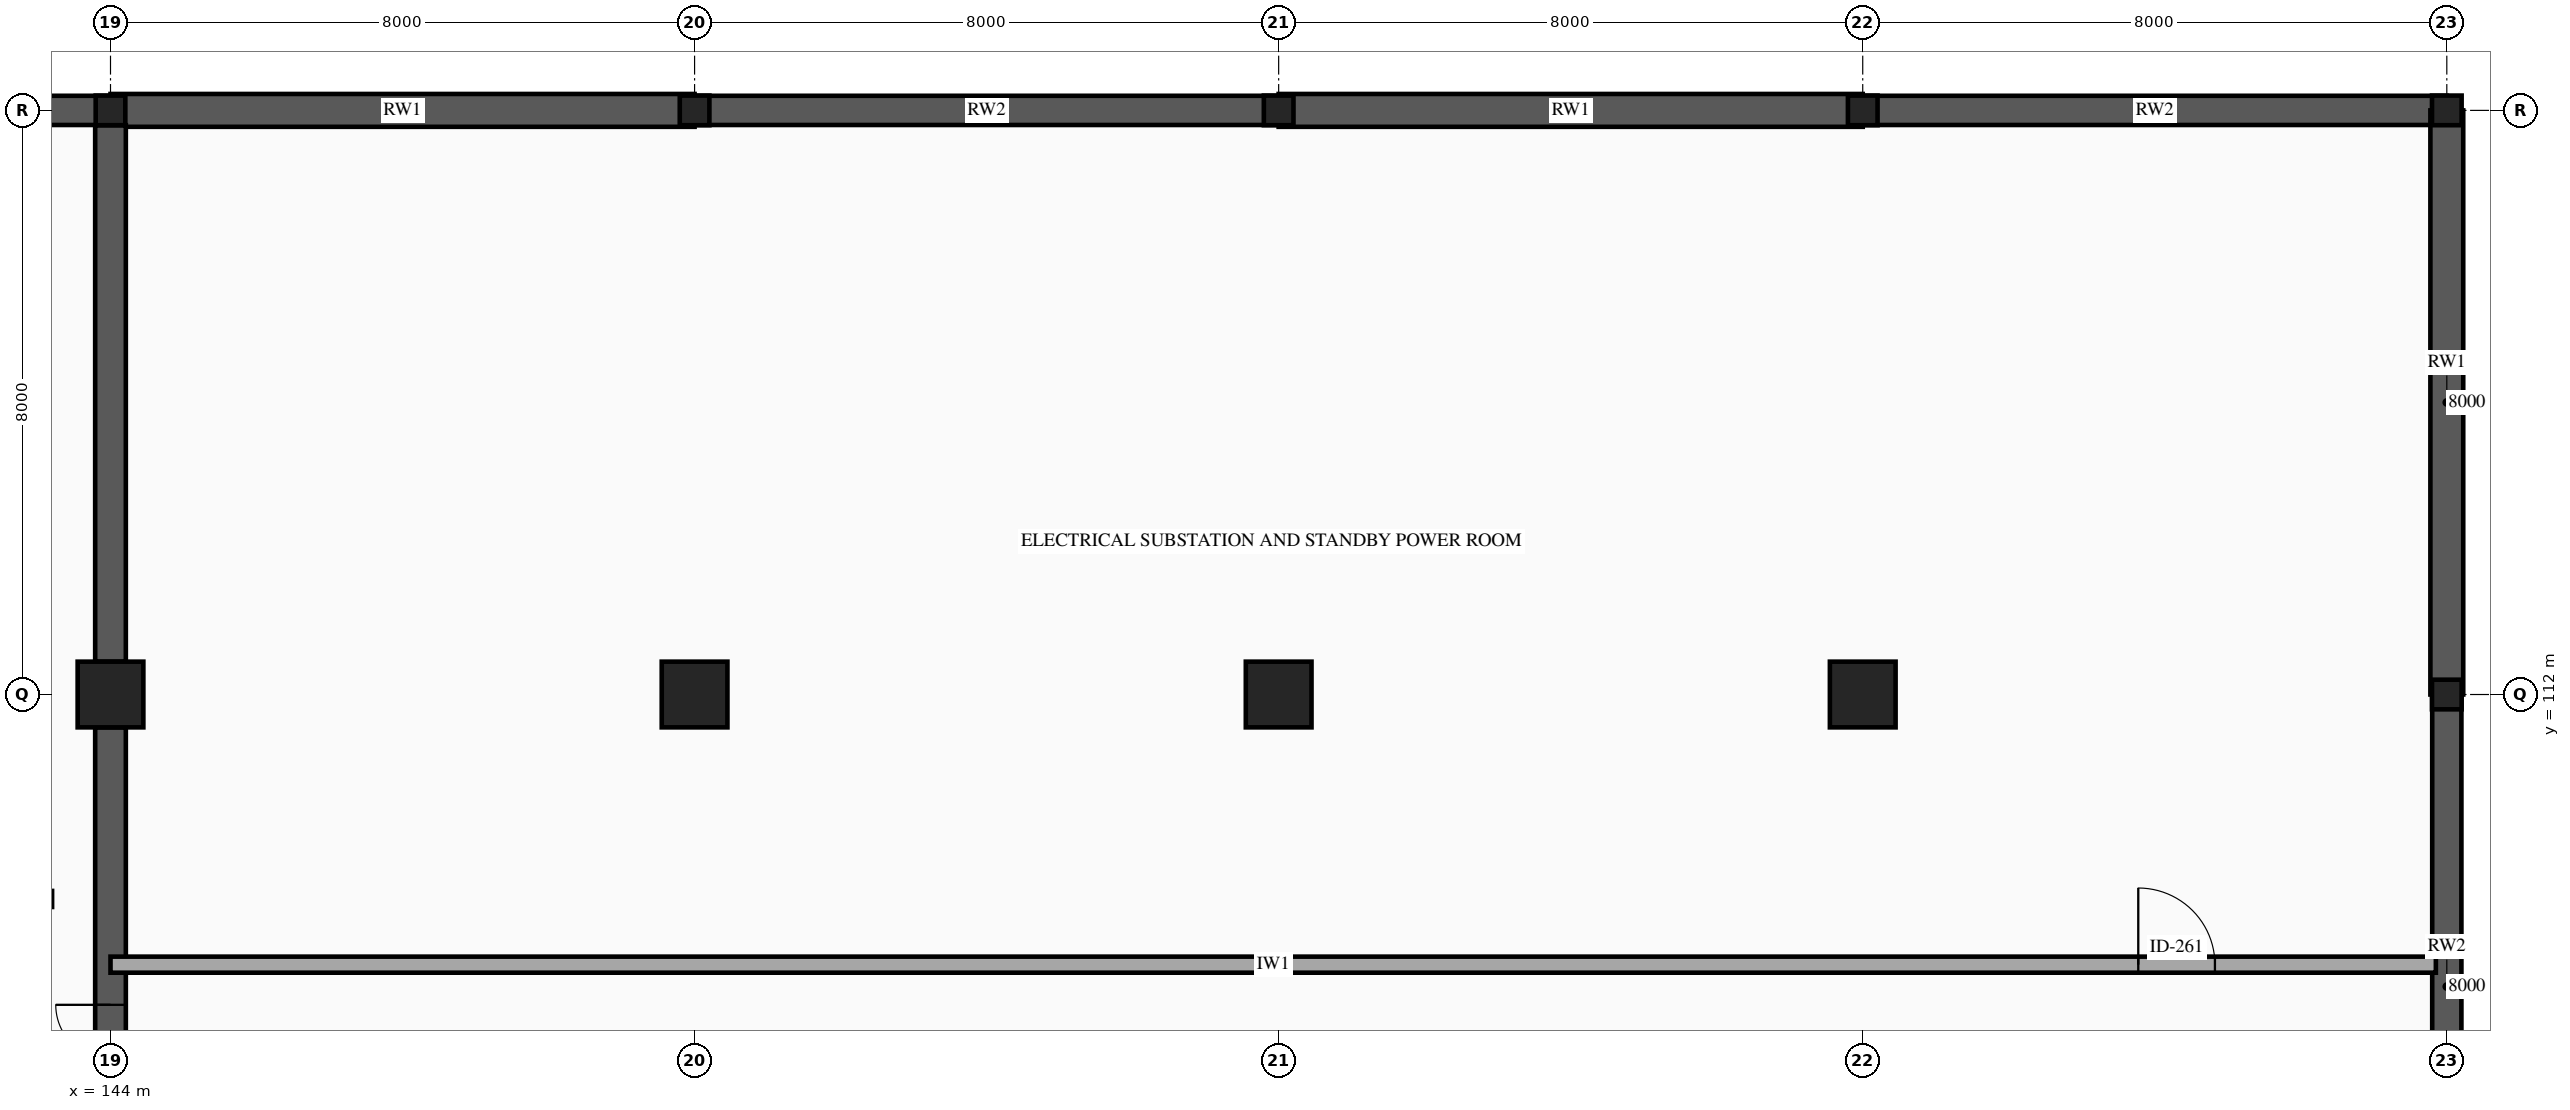
"""IFC4 building model, lengths in metres.
Left out: names, types, materials, properties, quantities, classifications, styles, units other than length and angle.
Written with IfcOpenShell. Run it as: python <this file> out.ifc"""

import sys

from ifc_helpers import new_model, si_unit, direction, frame, frame_2d, origin, origin_2d, place, context, subcontext, project, spatial, rectangle, hollow_rectangle, extrude, element, fill, save


model = new_model("IFC4")
c1 = context("Model", 3, precision=1e-05, world=origin(), true_north=direction((0.0, 1.0)))
c2 = subcontext(c1, "Body", "Model", "MODEL_VIEW")
j1 = project(units=[si_unit("LENGTHUNIT", "METRE"), si_unit("PLANEANGLEUNIT", "RADIAN")], contexts=[c1])
p1 = place(None, origin())
s1 = spatial("IfcSite", under=j1, at=p1, CompositionType="ELEMENT")
p2 = place(p1, origin())
s2 = spatial("IfcBuilding", under=s1, at=p2, CompositionType="ELEMENT")
p3 = place(p2, frame((0.0, 0.0, -4.8)))
s3 = spatial("IfcBuildingStorey", under=s2, at=p3, CompositionType="ELEMENT", Elevation=-4.8)
p4 = place(p3, frame((144.0, 112.0, 0.0), z_axis=(0.0, 0.0, 1.0), x_axis=(1.0, 0.0, 0.0)))
e1 = element("IfcColumn", 1, at=p4, inside=s3, PredefinedType="COLUMN", context=c2, shape_type="SweptSolid", body=[
    extrude(rectangle(XDim=0.9, YDim=0.9, at=origin_2d()), origin(), (0.0, 0.0, 1.0), 4.8),
])
p5 = place(p3, frame((144.0, 120.0, 0.0), z_axis=(0.0, 0.0, 1.0), x_axis=(1.0, 0.0, 0.0)))
e2 = element("IfcColumn", 2, at=p5, inside=s3, PredefinedType="COLUMN", context=c2, shape_type="SweptSolid", body=[
    extrude(hollow_rectangle(XDim=0.406, YDim=0.406, WallThickness=0.015, InnerFilletRadius=0.015, OuterFilletRadius=0.029, at=origin_2d()), origin(), (0.0, 0.0, 1.0), 4.8),
])
p6 = place(p3, frame((152.0, 112.0, 0.0), z_axis=(0.0, 0.0, 1.0), x_axis=(1.0, 0.0, 0.0)))
e3 = element("IfcColumn", 3, at=p6, inside=s3, PredefinedType="COLUMN", context=c2, shape_type="SweptSolid", body=[
    extrude(rectangle(XDim=0.9, YDim=0.9, at=origin_2d()), origin(), (0.0, 0.0, 1.0), 4.8),
])
p7 = place(p3, frame((152.0, 120.0, 0.0), z_axis=(0.0, 0.0, 1.0), x_axis=(1.0, 0.0, 0.0)))
e4 = element("IfcColumn", 4, at=p7, inside=s3, PredefinedType="COLUMN", context=c2, shape_type="SweptSolid", body=[
    extrude(hollow_rectangle(XDim=0.406, YDim=0.406, WallThickness=0.015, InnerFilletRadius=0.015, OuterFilletRadius=0.029, at=origin_2d()), origin(), (0.0, 0.0, 1.0), 4.8),
])
p8 = place(p3, frame((160.0, 112.0, 0.0), z_axis=(0.0, 0.0, 1.0), x_axis=(1.0, 0.0, 0.0)))
e5 = element("IfcColumn", 5, at=p8, inside=s3, PredefinedType="COLUMN", context=c2, shape_type="SweptSolid", body=[
    extrude(rectangle(XDim=0.9, YDim=0.9, at=origin_2d()), origin(), (0.0, 0.0, 1.0), 4.8),
])
p9 = place(p3, frame((160.0, 120.0, 0.0), z_axis=(0.0, 0.0, 1.0), x_axis=(1.0, 0.0, 0.0)))
e6 = element("IfcColumn", 6, at=p9, inside=s3, PredefinedType="COLUMN", context=c2, shape_type="SweptSolid", body=[
    extrude(hollow_rectangle(XDim=0.406, YDim=0.406, WallThickness=0.015, InnerFilletRadius=0.015, OuterFilletRadius=0.029, at=origin_2d()), origin(), (0.0, 0.0, 1.0), 4.8),
])
p10 = place(p3, frame((168.0, 112.0, 0.0), z_axis=(0.0, 0.0, 1.0), x_axis=(1.0, 0.0, 0.0)))
e7 = element("IfcColumn", 7, at=p10, inside=s3, PredefinedType="COLUMN", context=c2, shape_type="SweptSolid", body=[
    extrude(rectangle(XDim=0.9, YDim=0.9, at=origin_2d()), origin(), (0.0, 0.0, 1.0), 4.8),
])
for number, where, z_axis, x_axis in (
    (8, (168.0, 120.0, 0.0), (0.0, 0.0, 1.0), (1.0, 0.0, 0.0)),
    (9, (176.0, 112.0, 0.0), (0.0, 0.0, 1.0), (1.0, 0.0, 0.0)),
    (10, (176.0, 120.0, 0.0), (0.0, 0.0, 1.0), (1.0, 0.0, 0.0)),
):
    element("IfcColumn", number, at=place(p3, frame(where, z_axis=z_axis, x_axis=x_axis)), inside=s3, PredefinedType="COLUMN", context=c2, shape_type="SweptSolid", body=[
        extrude(hollow_rectangle(XDim=0.406, YDim=0.406, WallThickness=0.015, InnerFilletRadius=0.015, OuterFilletRadius=0.029, at=origin_2d()), origin(), (0.0, 0.0, 1.0), 4.8),
    ])
p11 = place(p3, frame((136.0, 120.0, 0.0), z_axis=(0.0, 0.0, 1.0), x_axis=(1.0, 0.0, 0.0)))
e11 = element("IfcWall", 11, at=p11, inside=s3, PredefinedType="USERDEFINED", context=c2, shape_type="SweptSolid", body=[
    extrude(rectangle(XDim=8.0, YDim=0.4, at=frame_2d((4.0, 0.0))), origin(), (0.0, 0.0, 1.0), 4.5),
])
p12 = place(p3, frame((144.0, 120.0, 0.0), z_axis=(0.0, 0.0, 1.0), x_axis=(1.0, 0.0, 0.0)))
e12 = element("IfcWall", 12, at=p12, inside=s3, PredefinedType="USERDEFINED", context=c2, shape_type="SweptSolid", body=[
    extrude(rectangle(XDim=8.0, YDim=0.45, at=frame_2d((4.0, 0.0))), origin(), (0.0, 0.0, 1.0), 4.5),
])
p13 = place(p3, frame((152.0, 120.0, 0.0), z_axis=(0.0, 0.0, 1.0), x_axis=(1.0, 0.0, 0.0)))
e13 = element("IfcWall", 13, at=p13, inside=s3, PredefinedType="USERDEFINED", context=c2, shape_type="SweptSolid", body=[
    extrude(rectangle(XDim=8.0, YDim=0.4, at=frame_2d((4.0, 0.0))), origin(), (0.0, 0.0, 1.0), 4.5),
])
p14 = place(p3, frame((160.0, 120.0, 0.0), z_axis=(0.0, 0.0, 1.0), x_axis=(1.0, 0.0, 0.0)))
e14 = element("IfcWall", 14, at=p14, inside=s3, PredefinedType="USERDEFINED", context=c2, shape_type="SweptSolid", body=[
    extrude(rectangle(XDim=8.0, YDim=0.45, at=frame_2d((4.0, 0.0))), origin(), (0.0, 0.0, 1.0), 4.5),
])
p15 = place(p3, frame((168.0, 120.0, 0.0), z_axis=(0.0, 0.0, 1.0), x_axis=(1.0, 0.0, 0.0)))
e15 = element("IfcWall", 15, at=p15, inside=s3, PredefinedType="USERDEFINED", context=c2, shape_type="SweptSolid", body=[
    extrude(rectangle(XDim=8.0, YDim=0.4, at=frame_2d((4.0, 0.0))), origin(), (0.0, 0.0, 1.0), 4.5),
])
p16 = place(p3, frame((176.0, 120.0, 0.0), z_axis=(0.0, 0.0, 1.0), x_axis=(0.0, -1.0, 0.0)))
e16 = element("IfcWall", 16, at=p16, inside=s3, PredefinedType="USERDEFINED", context=c2, shape_type="SweptSolid", body=[
    extrude(rectangle(XDim=8.0, YDim=0.45, at=frame_2d((4.0, 0.0))), origin(), (0.0, 0.0, 1.0), 4.5),
])
p17 = place(p3, frame((176.0, 112.0, 0.0), z_axis=(0.0, 0.0, 1.0), x_axis=(0.0, -1.0, 0.0)))
e17 = element("IfcWall", 17, at=p17, inside=s3, PredefinedType="USERDEFINED", context=c2, shape_type="SweptSolid", body=[
    extrude(rectangle(XDim=8.0, YDim=0.4, at=frame_2d((4.0, 0.0))), origin(), (0.0, 0.0, 1.0), 4.5),
])
p18 = place(p3, frame((144.0, 104.45, 0.0), z_axis=(0.0, 0.0, 1.0), x_axis=(0.0, 1.0, 0.0)))
e18 = element("IfcWall", 18, at=p18, inside=s3, PredefinedType="SHEAR", context=c2, shape_type="SweptSolid", body=[
    extrude(rectangle(XDim=7.1, YDim=0.42, at=frame_2d((3.55, 0.0))), origin(), (0.0, 0.0, 1.0), 4.58),
])
p19 = place(p18, frame((1.8, 0.0, 0.0)))
e19 = element("IfcOpeningElement", 19, at=p19, cuts=e18, PredefinedType="OPENING", context=c2, shape_type="SweptSolid", body=[
    extrude(rectangle(XDim=1.5, YDim=2.15, at=frame_2d((0.75, 1.075))), frame((0.0, 0.22, 0.0), z_axis=(0.0, -1.0, 0.0), x_axis=(1.0, 0.0, 0.0)), (0.0, 0.0, 1.0), 0.44),
])
p20 = place(p3, frame((144.0, 112.45, 0.0), z_axis=(0.0, 0.0, 1.0), x_axis=(0.0, 1.0, 0.0)))
e20 = element("IfcWall", 20, at=p20, inside=s3, PredefinedType="SHEAR", context=c2, shape_type="SweptSolid", body=[
    extrude(rectangle(XDim=7.347, YDim=0.42, at=frame_2d((3.674, 0.0))), origin(), (0.0, 0.0, 1.0), 4.58),
])
p21 = place(p3, frame((144.0, 108.3, 0.0), z_axis=(0.0, 0.0, 1.0), x_axis=(1.0, 0.0, 0.0)))
e21 = element("IfcWall", 21, at=p21, inside=s3, PredefinedType="PARTITIONING", context=c2, shape_type="SweptSolid", body=[
    extrude(rectangle(XDim=31.85, YDim=0.22, at=frame_2d((15.925, 0.0))), origin(), (0.0, 0.0, 1.0), 3.78),
])
p22 = place(p21, frame((27.774, 0.0, 0.0)))
e22 = element("IfcOpeningElement", 22, at=p22, cuts=e21, PredefinedType="OPENING", context=c2, shape_type="SweptSolid", body=[
    extrude(rectangle(XDim=1.05, YDim=2.15, at=frame_2d((0.525, 1.075))), frame((0.0, 0.12, 0.0), z_axis=(0.0, -1.0, 0.0), x_axis=(1.0, 0.0, 0.0)), (0.0, 0.0, 1.0), 0.24),
])
p23 = place(p19, origin())
e23 = element("IfcDoor", 23, at=p23, inside=s3, OperationType="DOUBLE_DOOR_SINGLE_SWING", PredefinedType="DOOR", context=c2, shape_type="SweptSolid", body=[
    extrude(rectangle(XDim=1.5, YDim=2.15, at=frame_2d((0.75, 1.075))), frame((0.0, 0.025, 0.0), z_axis=(0.0, -1.0, 0.0), x_axis=(1.0, 0.0, 0.0)), (0.0, 0.0, 1.0), 0.05),
])
fill(e19, e23)
p24 = place(p22, origin())
e24 = element("IfcDoor", 24, at=p24, inside=s3, OperationType="SINGLE_SWING_LEFT", PredefinedType="DOOR", context=c2, shape_type="SweptSolid", body=[
    extrude(rectangle(XDim=1.05, YDim=2.15, at=frame_2d((0.525, 1.075))), frame((0.0, 0.025, 0.0), z_axis=(0.0, -1.0, 0.0), x_axis=(1.0, 0.0, 0.0)), (0.0, 0.0, 1.0), 0.05),
])
fill(e22, e24)
save(model, sys.argv[1])
